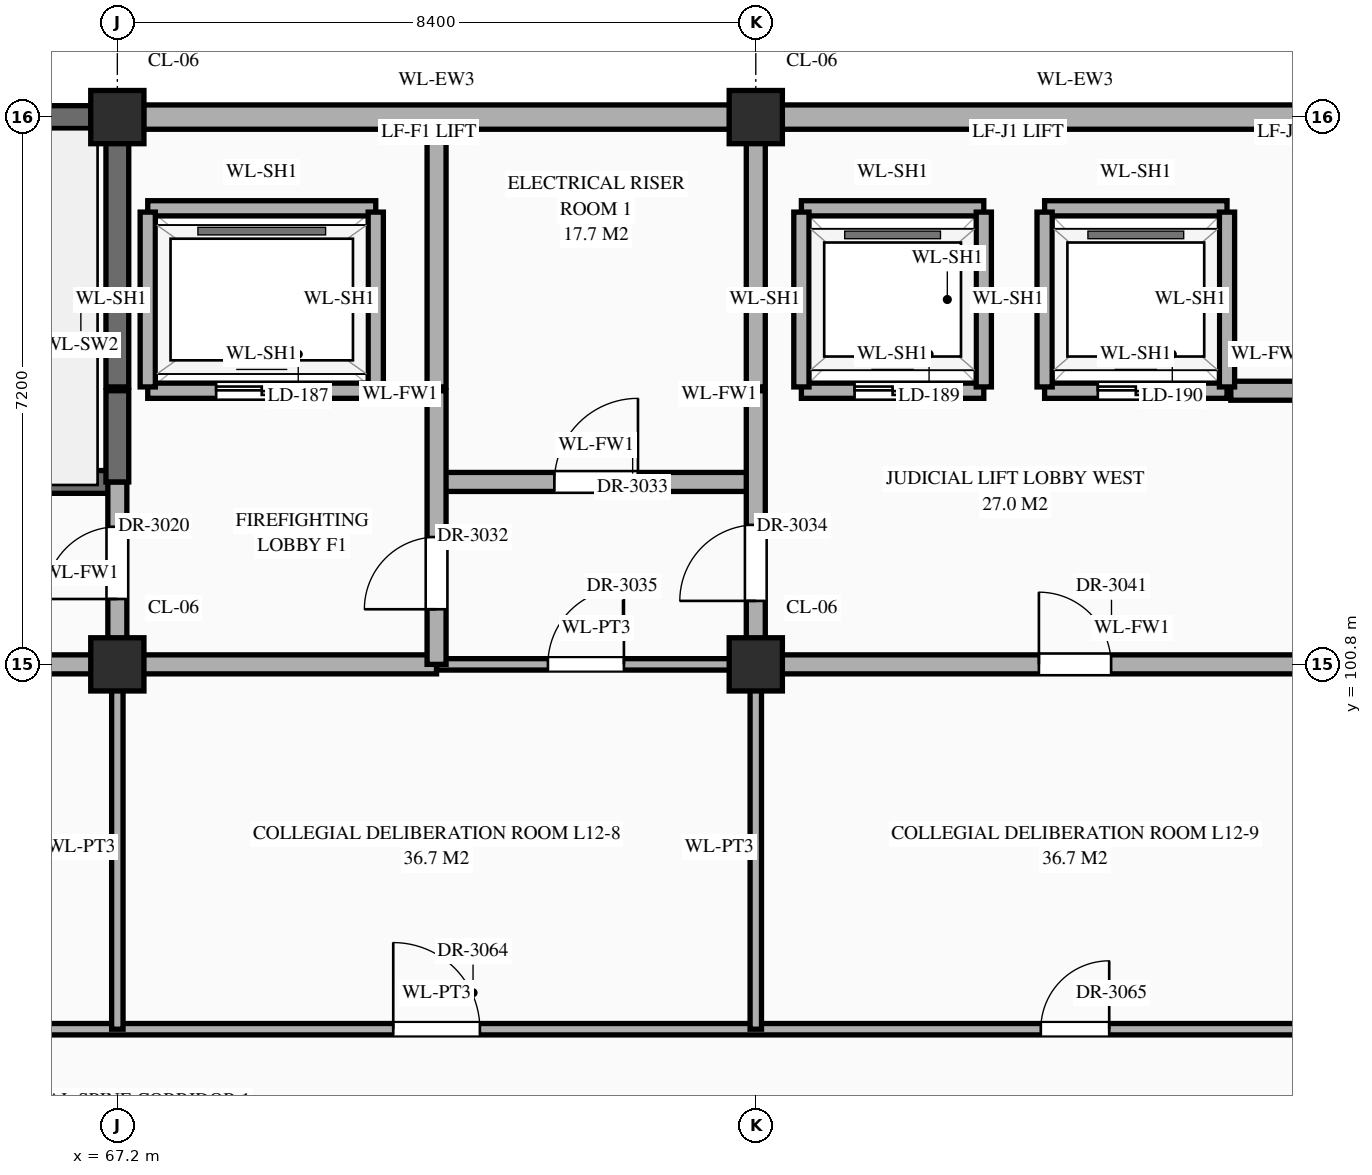
"""IFC4 building model, lengths in metres.
Left out: names, types, materials, properties, quantities, classifications, styles, units other than length and angle.
Written with IfcOpenShell. Run it as: python <this file> out.ifc"""

import sys

from ifc_helpers import new_model, si_unit, direction, frame, frame_2d, origin, origin_2d, place, context, subcontext, project, spatial, rectangle, extrude, element, fill, save


model = new_model("IFC4")
c1 = context("Model", 3, precision=1e-05, world=origin(), true_north=direction((0.0, 1.0)))
c2 = subcontext(c1, "Body", "Model", "MODEL_VIEW")
j1 = project(units=[si_unit("LENGTHUNIT", "METRE"), si_unit("PLANEANGLEUNIT", "RADIAN")], contexts=[c1])
p1 = place(None, origin())
s1 = spatial("IfcSite", under=j1, at=p1, CompositionType="ELEMENT")
p2 = place(p1, origin())
s2 = spatial("IfcBuilding", under=s1, at=p2, CompositionType="ELEMENT")
p3 = place(p2, frame((0.0, 0.0, 51.9)))
s3 = spatial("IfcBuildingStorey", under=s2, at=p3, CompositionType="ELEMENT", Elevation=51.9)
for number, where, z_axis, x_axis in (
    (1, (67.2, 100.8, 0.0), (0.0, 0.0, 1.0), (1.0, 0.0, 0.0)),
    (2, (67.2, 108.0, 0.0), (0.0, 0.0, 1.0), (1.0, 0.0, 0.0)),
    (3, (75.6, 100.8, 0.0), (0.0, 0.0, 1.0), (1.0, 0.0, 0.0)),
    (4, (75.6, 108.0, 0.0), (0.0, 0.0, 1.0), (1.0, 0.0, 0.0)),
):
    element("IfcColumn", number, at=place(p3, frame(where, z_axis=z_axis, x_axis=x_axis)), inside=s3, PredefinedType="COLUMN", context=c2, shape_type="SweptSolid", body=[
        extrude(rectangle(XDim=0.7, YDim=0.7, at=origin_2d()), origin(), (0.0, 0.0, 1.0), 4.2),
    ])
p4 = place(p3, frame((59.145, 108.0, 0.0), z_axis=(0.0, 0.0, 1.0), x_axis=(1.0, 0.0, 0.0)))
e5 = element("IfcWall", 5, at=p4, inside=s3, PredefinedType="SHEAR", context=c2, shape_type="SweptSolid", body=[
    extrude(rectangle(XDim=7.71, YDim=0.3, at=frame_2d((3.855, 0.0))), origin(), (0.0, 0.0, 1.0), 3.96),
])
for number, where, z_axis, x_axis in (
    (6, (67.545, 108.0, 0.0), (0.0, 0.0, 1.0), (1.0, 0.0, 0.0)),
    (7, (75.945, 108.0, 0.0), (0.0, 0.0, 1.0), (1.0, 0.0, 0.0)),
):
    element("IfcWall", number, at=place(p3, frame(where, z_axis=z_axis, x_axis=x_axis)), inside=s3, PredefinedType="STANDARD", context=c2, shape_type="SweptSolid", body=[
        extrude(rectangle(XDim=7.71, YDim=0.32, at=frame_2d((3.855, 0.0))), origin(), (0.0, 0.0, 1.0), 3.31),
    ])
p5 = place(p3, frame((58.8, 96.0, 0.0), z_axis=(0.0, 0.0, 1.0), x_axis=(1.0, 0.0, 0.0)))
e8 = element("IfcWall", 8, at=p5, inside=s3, PredefinedType="STANDARD", context=c2, shape_type="SweptSolid", body=[
    extrude(rectangle(XDim=25.2, YDim=0.15, at=frame_2d((12.6, 0.0))), origin(), (0.0, 0.0, 1.0), 3.96),
])
p6 = place(p5, frame((3.67, 0.0, 0.0)))
e9 = element("IfcOpeningElement", 9, at=p6, cuts=e8, PredefinedType="OPENING", context=c2, shape_type="SweptSolid", body=[
    extrude(rectangle(XDim=1.06, YDim=2.4, at=frame_2d((0.53, 1.2))), frame((0.0, 0.087, 0.0), z_axis=(0.0, -1.0, 0.0), x_axis=(1.0, 0.0, 0.0)), (0.0, 0.0, 1.0), 0.174),
])
p7 = place(p5, frame((12.03, 0.0, 0.0)))
e10 = element("IfcOpeningElement", 10, at=p7, cuts=e8, PredefinedType="OPENING", context=c2, shape_type="SweptSolid", body=[
    extrude(rectangle(XDim=1.14, YDim=2.4, at=frame_2d((0.57, 1.2))), frame((0.0, 0.087, 0.0), z_axis=(0.0, -1.0, 0.0), x_axis=(1.0, 0.0, 0.0)), (0.0, 0.0, 1.0), 0.174),
])
p8 = place(p5, frame((20.55, 0.0, 0.0)))
e11 = element("IfcOpeningElement", 11, at=p8, cuts=e8, PredefinedType="OPENING", context=c2, shape_type="SweptSolid", body=[
    extrude(rectangle(XDim=0.9, YDim=2.15, at=frame_2d((0.45, 1.075))), frame((0.0, 0.087, 0.0), z_axis=(0.0, -1.0, 0.0), x_axis=(1.0, 0.0, 0.0)), (0.0, 0.0, 1.0), 0.174),
])
p9 = place(p3, frame((58.8, 100.8, 0.0), z_axis=(0.0, 0.0, 1.0), x_axis=(1.0, 0.0, 0.0)))
e12 = element("IfcWall", 12, at=p9, inside=s3, PredefinedType="STANDARD", context=c2, shape_type="SweptSolid", body=[
    extrude(rectangle(XDim=12.6, YDim=0.25, at=frame_2d((6.3, 0.0))), origin(), (0.0, 0.0, 1.0), 3.11),
])
p10 = place(p9, frame((3.7, 0.0, 0.0)))
e13 = element("IfcOpeningElement", 13, at=p10, cuts=e12, PredefinedType="OPENING", context=c2, shape_type="SweptSolid", body=[
    extrude(rectangle(XDim=1.0, YDim=2.2, at=frame_2d((0.5, 1.1))), frame((0.0, 0.137, 0.0), z_axis=(0.0, -1.0, 0.0), x_axis=(1.0, 0.0, 0.0)), (0.0, 0.0, 1.0), 0.274),
])
p11 = place(p3, frame((71.4, 100.8, 0.0), z_axis=(0.0, 0.0, 1.0), x_axis=(1.0, 0.0, 0.0)))
e14 = element("IfcWall", 14, at=p11, inside=s3, PredefinedType="STANDARD", context=c2, shape_type="SweptSolid", body=[
    extrude(rectangle(XDim=4.2, YDim=0.15, at=frame_2d((2.1, 0.0))), origin(), (0.0, 0.0, 1.0), 3.11),
])
p12 = place(p11, frame((1.465, 0.0, 0.0)))
e15 = element("IfcOpeningElement", 15, at=p12, cuts=e14, PredefinedType="OPENING", context=c2, shape_type="SweptSolid", body=[
    extrude(rectangle(XDim=1.0, YDim=2.25, at=frame_2d((0.5, 1.125))), frame((0.0, 0.087, 0.0), z_axis=(0.0, -1.0, 0.0), x_axis=(1.0, 0.0, 0.0)), (0.0, 0.0, 1.0), 0.174),
])
p13 = place(p3, frame((75.6, 100.8, 0.0), z_axis=(0.0, 0.0, 1.0), x_axis=(1.0, 0.0, 0.0)))
e16 = element("IfcWall", 16, at=p13, inside=s3, PredefinedType="STANDARD", context=c2, shape_type="SweptSolid", body=[
    extrude(rectangle(XDim=16.8, YDim=0.25, at=frame_2d((8.4, 0.0))), origin(), (0.0, 0.0, 1.0), 3.11),
])
p14 = place(p13, frame((3.725, 0.0, 0.0)))
e17 = element("IfcOpeningElement", 17, at=p14, cuts=e16, PredefinedType="OPENING", context=c2, shape_type="SweptSolid", body=[
    extrude(rectangle(XDim=0.95, YDim=2.15, at=frame_2d((0.475, 1.075))), frame((0.0, 0.137, 0.0), z_axis=(0.0, -1.0, 0.0), x_axis=(1.0, 0.0, 0.0)), (0.0, 0.0, 1.0), 0.274),
])
p15 = place(p13, frame((9.685, 0.0, 0.0)))
e18 = element("IfcOpeningElement", 18, at=p15, cuts=e16, PredefinedType="OPENING", context=c2, shape_type="SweptSolid", body=[
    extrude(rectangle(XDim=1.1, YDim=2.2, at=frame_2d((0.55, 1.1))), frame((0.0, 0.137, 0.0), z_axis=(0.0, -1.0, 0.0), x_axis=(1.0, 0.0, 0.0)), (0.0, 0.0, 1.0), 0.274),
])
p16 = place(p13, frame((12.5, 0.0, 0.0)))
e19 = element("IfcOpeningElement", 19, at=p16, cuts=e16, PredefinedType="OPENING", context=c2, shape_type="SweptSolid", body=[
    extrude(rectangle(XDim=1.0, YDim=2.2, at=frame_2d((0.5, 1.1))), frame((0.0, 0.137, 0.0), z_axis=(0.0, -1.0, 0.0), x_axis=(1.0, 0.0, 0.0)), (0.0, 0.0, 1.0), 0.274),
])
p17 = place(p13, frame((14.89, 0.0, 0.0)))
e20 = element("IfcOpeningElement", 20, at=p17, cuts=e16, PredefinedType="OPENING", context=c2, shape_type="SweptSolid", body=[
    extrude(rectangle(XDim=0.95, YDim=2.15, at=frame_2d((0.475, 1.075))), frame((0.0, 0.137, 0.0), z_axis=(0.0, -1.0, 0.0), x_axis=(1.0, 0.0, 0.0)), (0.0, 0.0, 1.0), 0.274),
])
p18 = place(p3, frame((58.8, 103.2, 0.0), z_axis=(0.0, 0.0, 1.0), x_axis=(1.0, 0.0, 0.0)))
e21 = element("IfcWall", 21, at=p18, inside=s3, PredefinedType="SHEAR", context=c2, shape_type="SweptSolid", body=[
    extrude(rectangle(XDim=8.4, YDim=0.3, at=frame_2d((4.2, 0.0))), origin(), (0.0, 0.0, 1.0), 3.96),
])
p19 = place(p18, frame((0.65, 0.0, 0.0)))
e22 = element("IfcOpeningElement", 22, at=p19, cuts=e21, PredefinedType="OPENING", context=c2, shape_type="SweptSolid", body=[
    extrude(rectangle(XDim=1.1, YDim=2.2, at=frame_2d((0.55, 1.1))), frame((0.0, 0.162, 0.0), z_axis=(0.0, -1.0, 0.0), x_axis=(1.0, 0.0, 0.0)), (0.0, 0.0, 1.0), 0.324),
])
p20 = place(p3, frame((71.4, 103.2, 0.0), z_axis=(0.0, 0.0, 1.0), x_axis=(1.0, 0.0, 0.0)))
e23 = element("IfcWall", 23, at=p20, inside=s3, PredefinedType="STANDARD", context=c2, shape_type="SweptSolid", body=[
    extrude(rectangle(XDim=4.2, YDim=0.25, at=frame_2d((2.1, 0.0))), origin(), (0.0, 0.0, 1.0), 3.96),
])
p21 = place(p20, frame((1.55, 0.0, 0.0)))
e24 = element("IfcOpeningElement", 24, at=p21, cuts=e23, PredefinedType="OPENING", context=c2, shape_type="SweptSolid", body=[
    extrude(rectangle(XDim=1.1, YDim=2.2, at=frame_2d((0.55, 1.1))), frame((0.0, 0.137, 0.0), z_axis=(0.0, -1.0, 0.0), x_axis=(1.0, 0.0, 0.0)), (0.0, 0.0, 1.0), 0.274),
])
p22 = place(p3, frame((67.6, 104.4, 0.0), z_axis=(0.0, 0.0, 1.0), x_axis=(1.0, 0.0, 0.0)))
e25 = element("IfcWall", 25, at=p22, inside=s3, PredefinedType="STANDARD", context=c2, shape_type="SweptSolid", body=[
    extrude(rectangle(XDim=3.0, YDim=0.2, at=frame_2d((1.5, 0.0))), origin(), (0.0, 0.0, 1.0), 3.96),
])
p23 = place(p22, frame((0.9, 0.0, 0.0)))
e26 = element("IfcOpeningElement", 26, at=p23, cuts=e25, PredefinedType="OPENING", context=c2, shape_type="SweptSolid", body=[
    extrude(rectangle(XDim=1.2, YDim=2.15, at=frame_2d((0.6, 1.075))), frame((0.0, 0.112, 0.0), z_axis=(0.0, -1.0, 0.0), x_axis=(1.0, 0.0, 0.0)), (0.0, 0.0, 1.0), 0.224),
])
p24 = place(p3, frame((76.2, 104.4, 0.0), z_axis=(0.0, 0.0, 1.0), x_axis=(1.0, 0.0, 0.0)))
e27 = element("IfcWall", 27, at=p24, inside=s3, PredefinedType="STANDARD", context=c2, shape_type="SweptSolid", body=[
    extrude(rectangle(XDim=2.4, YDim=0.2, at=frame_2d((1.2, 0.0))), origin(), (0.0, 0.0, 1.0), 3.96),
])
p25 = place(p24, frame((0.7, 0.0, 0.0)))
e28 = element("IfcOpeningElement", 28, at=p25, cuts=e27, PredefinedType="OPENING", context=c2, shape_type="SweptSolid", body=[
    extrude(rectangle(XDim=1.0, YDim=2.15, at=frame_2d((0.5, 1.075))), frame((0.0, 0.112, 0.0), z_axis=(0.0, -1.0, 0.0), x_axis=(1.0, 0.0, 0.0)), (0.0, 0.0, 1.0), 0.224),
])
p26 = place(p3, frame((79.4, 104.4, 0.0), z_axis=(0.0, 0.0, 1.0), x_axis=(1.0, 0.0, 0.0)))
e29 = element("IfcWall", 29, at=p26, inside=s3, PredefinedType="STANDARD", context=c2, shape_type="SweptSolid", body=[
    extrude(rectangle(XDim=2.4, YDim=0.2, at=frame_2d((1.2, 0.0))), origin(), (0.0, 0.0, 1.0), 3.96),
])
p27 = place(p26, frame((0.7, 0.0, 0.0)))
e30 = element("IfcOpeningElement", 30, at=p27, cuts=e29, PredefinedType="OPENING", context=c2, shape_type="SweptSolid", body=[
    extrude(rectangle(XDim=1.0, YDim=2.15, at=frame_2d((0.5, 1.075))), frame((0.0, 0.112, 0.0), z_axis=(0.0, -1.0, 0.0), x_axis=(1.0, 0.0, 0.0)), (0.0, 0.0, 1.0), 0.224),
])
p28 = place(p3, frame((81.85, 104.4, 0.0), z_axis=(0.0, 0.0, 1.0), x_axis=(1.0, 0.0, 0.0)))
e31 = element("IfcWall", 31, at=p28, inside=s3, PredefinedType="STANDARD", context=c2, shape_type="SweptSolid", body=[
    extrude(rectangle(XDim=2.1, YDim=0.25, at=frame_2d((1.05, 0.0))), origin(), (0.0, 0.0, 1.0), 3.96),
])
p29 = place(p3, frame((67.6, 106.8, 0.0), z_axis=(0.0, 0.0, 1.0), x_axis=(1.0, 0.0, 0.0)))
e32 = element("IfcWall", 32, at=p29, inside=s3, PredefinedType="STANDARD", context=c2, shape_type="SweptSolid", body=[
    extrude(rectangle(XDim=3.0, YDim=0.2, at=frame_2d((1.5, 0.0))), origin(), (0.0, 0.0, 1.0), 3.96),
])
for number, where, z_axis, x_axis in (
    (33, (76.2, 106.8, 0.0), (0.0, 0.0, 1.0), (1.0, 0.0, 0.0)),
    (34, (79.4, 106.8, 0.0), (0.0, 0.0, 1.0), (1.0, 0.0, 0.0)),
):
    element("IfcWall", number, at=place(p3, frame(where, z_axis=z_axis, x_axis=x_axis)), inside=s3, PredefinedType="STANDARD", context=c2, shape_type="SweptSolid", body=[
        extrude(rectangle(XDim=2.4, YDim=0.2, at=frame_2d((1.2, 0.0))), origin(), (0.0, 0.0, 1.0), 3.96),
    ])
p30 = place(p3, frame((67.2, 96.0, 0.0), z_axis=(0.0, 0.0, 1.0), x_axis=(0.0, 1.0, 0.0)))
e35 = element("IfcWall", 35, at=p30, inside=s3, PredefinedType="STANDARD", context=c2, shape_type="SweptSolid", body=[
    extrude(rectangle(XDim=4.8, YDim=0.15, at=frame_2d((2.4, 0.0))), origin(), (0.0, 0.0, 1.0), 3.21),
])
p31 = place(p3, frame((67.2, 100.8, 0.0), z_axis=(0.0, 0.0, 1.0), x_axis=(0.0, 1.0, 0.0)))
e36 = element("IfcWall", 36, at=p31, inside=s3, PredefinedType="STANDARD", context=c2, shape_type="SweptSolid", body=[
    extrude(rectangle(XDim=2.4, YDim=0.25, at=frame_2d((1.2, 0.0))), origin(), (0.0, 0.0, 1.0), 3.21),
])
p32 = place(p31, frame((0.86, 0.0, 0.0)))
e37 = element("IfcOpeningElement", 37, at=p32, cuts=e36, PredefinedType="OPENING", context=c2, shape_type="SweptSolid", body=[
    extrude(rectangle(XDim=0.95, YDim=2.15, at=frame_2d((0.475, 1.075))), frame((0.0, 0.137, 0.0), z_axis=(0.0, -1.0, 0.0), x_axis=(1.0, 0.0, 0.0)), (0.0, 0.0, 1.0), 0.274),
])
p33 = place(p3, frame((67.2, 103.2, 0.0), z_axis=(0.0, 0.0, 1.0), x_axis=(0.0, 1.0, 0.0)))
e38 = element("IfcWall", 38, at=p33, inside=s3, PredefinedType="SHEAR", context=c2, shape_type="SweptSolid", body=[
    extrude(rectangle(XDim=1.2, YDim=0.3, at=frame_2d((0.6, 0.0))), origin(), (0.0, 0.0, 1.0), 3.96),
])
p34 = place(p3, frame((67.2, 104.45, 0.0), z_axis=(0.0, 0.0, 1.0), x_axis=(0.0, 1.0, 0.0)))
e39 = element("IfcWall", 39, at=p34, inside=s3, PredefinedType="SHEAR", context=c2, shape_type="SweptSolid", body=[
    extrude(rectangle(XDim=3.46, YDim=0.3, at=frame_2d((1.73, 0.0))), origin(), (0.0, 0.0, 1.0), 3.96),
])
for number, where, z_axis, x_axis in (
    (40, (67.6, 104.45, 0.0), (0.0, 0.0, 1.0), (0.0, 1.0, 0.0)),
    (41, (70.6, 104.45, 0.0), (0.0, 0.0, 1.0), (0.0, 1.0, 0.0)),
):
    element("IfcWall", number, at=place(p3, frame(where, z_axis=z_axis, x_axis=x_axis)), inside=s3, PredefinedType="STANDARD", context=c2, shape_type="SweptSolid", body=[
        extrude(rectangle(XDim=2.3, YDim=0.2, at=frame_2d((1.15, 0.0))), origin(), (0.0, 0.0, 1.0), 3.96),
    ])
p35 = place(p3, frame((71.4, 100.8, 0.0), z_axis=(0.0, 0.0, 1.0), x_axis=(0.0, 1.0, 0.0)))
e42 = element("IfcWall", 42, at=p35, inside=s3, PredefinedType="STANDARD", context=c2, shape_type="SweptSolid", body=[
    extrude(rectangle(XDim=3.6, YDim=0.25, at=frame_2d((1.8, 0.0))), origin(), (0.0, 0.0, 1.0), 3.61),
])
p36 = place(p35, frame((0.725, 0.0, 0.0)))
e43 = element("IfcOpeningElement", 43, at=p36, cuts=e42, PredefinedType="OPENING", context=c2, shape_type="SweptSolid", body=[
    extrude(rectangle(XDim=0.95, YDim=2.15, at=frame_2d((0.475, 1.075))), frame((0.0, 0.137, 0.0), z_axis=(0.0, -1.0, 0.0), x_axis=(1.0, 0.0, 0.0)), (0.0, 0.0, 1.0), 0.274),
])
p37 = place(p3, frame((71.4, 104.45, 0.0), z_axis=(0.0, 0.0, 1.0), x_axis=(0.0, 1.0, 0.0)))
e44 = element("IfcWall", 44, at=p37, inside=s3, PredefinedType="STANDARD", context=c2, shape_type="SweptSolid", body=[
    extrude(rectangle(XDim=3.46, YDim=0.25, at=frame_2d((1.73, 0.0))), origin(), (0.0, 0.0, 1.0), 3.61),
])
p38 = place(p3, frame((75.6, 96.0, 0.0), z_axis=(0.0, 0.0, 1.0), x_axis=(0.0, 1.0, 0.0)))
e45 = element("IfcWall", 45, at=p38, inside=s3, PredefinedType="STANDARD", context=c2, shape_type="SweptSolid", body=[
    extrude(rectangle(XDim=4.8, YDim=0.15, at=frame_2d((2.4, 0.0))), origin(), (0.0, 0.0, 1.0), 3.21),
])
p39 = place(p3, frame((75.6, 100.8, 0.0), z_axis=(0.0, 0.0, 1.0), x_axis=(0.0, 1.0, 0.0)))
e46 = element("IfcWall", 46, at=p39, inside=s3, PredefinedType="STANDARD", context=c2, shape_type="SweptSolid", body=[
    extrude(rectangle(XDim=3.6, YDim=0.25, at=frame_2d((1.8, 0.0))), origin(), (0.0, 0.0, 1.0), 3.21),
])
p40 = place(p39, frame((0.835, 0.0, 0.0)))
e47 = element("IfcOpeningElement", 47, at=p40, cuts=e46, PredefinedType="OPENING", context=c2, shape_type="SweptSolid", body=[
    extrude(rectangle(XDim=1.0, YDim=2.2, at=frame_2d((0.5, 1.1))), frame((0.0, 0.137, 0.0), z_axis=(0.0, -1.0, 0.0), x_axis=(1.0, 0.0, 0.0)), (0.0, 0.0, 1.0), 0.274),
])
p41 = place(p3, frame((75.6, 104.45, 0.0), z_axis=(0.0, 0.0, 1.0), x_axis=(0.0, 1.0, 0.0)))
e48 = element("IfcWall", 48, at=p41, inside=s3, PredefinedType="STANDARD", context=c2, shape_type="SweptSolid", body=[
    extrude(rectangle(XDim=3.46, YDim=0.25, at=frame_2d((1.73, 0.0))), origin(), (0.0, 0.0, 1.0), 3.21),
])
for number, where, z_axis, x_axis in (
    (49, (76.2, 104.45, 0.0), (0.0, 0.0, 1.0), (0.0, 1.0, 0.0)),
    (50, (78.6, 104.45, 0.0), (0.0, 0.0, 1.0), (0.0, 1.0, 0.0)),
    (51, (79.4, 104.45, 0.0), (0.0, 0.0, 1.0), (0.0, 1.0, 0.0)),
    (52, (81.8, 104.45, 0.0), (0.0, 0.0, 1.0), (0.0, 1.0, 0.0)),
):
    element("IfcWall", number, at=place(p3, frame(where, z_axis=z_axis, x_axis=x_axis)), inside=s3, PredefinedType="STANDARD", context=c2, shape_type="SweptSolid", body=[
        extrude(rectangle(XDim=2.3, YDim=0.2, at=frame_2d((1.15, 0.0))), origin(), (0.0, 0.0, 1.0), 3.96),
    ])
p42 = place(p23, origin())
e53 = element("IfcDoor", 53, at=p42, inside=s3, OperationType="DOUBLE_DOOR_SLIDING", PredefinedType="DOOR", context=c2, shape_type="SweptSolid", body=[
    extrude(rectangle(XDim=1.2, YDim=2.15, at=frame_2d((0.6, 1.075))), frame((0.0, 0.025, 0.0), z_axis=(0.0, -1.0, 0.0), x_axis=(1.0, 0.0, 0.0)), (0.0, 0.0, 1.0), 0.05),
])
fill(e26, e53)
p43 = place(p25, origin())
e54 = element("IfcDoor", 54, at=p43, inside=s3, OperationType="DOUBLE_DOOR_SLIDING", PredefinedType="DOOR", context=c2, shape_type="SweptSolid", body=[
    extrude(rectangle(XDim=1.0, YDim=2.15, at=frame_2d((0.5, 1.075))), frame((0.0, 0.025, 0.0), z_axis=(0.0, -1.0, 0.0), x_axis=(1.0, 0.0, 0.0)), (0.0, 0.0, 1.0), 0.05),
])
fill(e28, e54)
p44 = place(p27, origin())
e55 = element("IfcDoor", 55, at=p44, inside=s3, OperationType="DOUBLE_DOOR_SLIDING", PredefinedType="DOOR", context=c2, shape_type="SweptSolid", body=[
    extrude(rectangle(XDim=1.0, YDim=2.15, at=frame_2d((0.5, 1.075))), frame((0.0, 0.025, 0.0), z_axis=(0.0, -1.0, 0.0), x_axis=(1.0, 0.0, 0.0)), (0.0, 0.0, 1.0), 0.05),
])
fill(e30, e55)
p45 = place(p32, origin())
e56 = element("IfcDoor", 56, at=p45, inside=s3, OperationType="SINGLE_SWING_LEFT", PredefinedType="DOOR", context=c2, shape_type="SweptSolid", body=[
    extrude(rectangle(XDim=0.95, YDim=2.15, at=frame_2d((0.475, 1.075))), frame((0.0, 0.025, 0.0), z_axis=(0.0, -1.0, 0.0), x_axis=(1.0, 0.0, 0.0)), (0.0, 0.0, 1.0), 0.05),
])
fill(e37, e56)
p46 = place(p36, origin())
e57 = element("IfcDoor", 57, at=p46, inside=s3, OperationType="SINGLE_SWING_LEFT", PredefinedType="DOOR", context=c2, shape_type="SweptSolid", body=[
    extrude(rectangle(XDim=0.95, YDim=2.15, at=frame_2d((0.475, 1.075))), frame((0.0, 0.025, 0.0), z_axis=(0.0, -1.0, 0.0), x_axis=(1.0, 0.0, 0.0)), (0.0, 0.0, 1.0), 0.05),
])
fill(e43, e57)
p47 = place(p21, origin())
e58 = element("IfcDoor", 58, at=p47, inside=s3, OperationType="SINGLE_SWING_RIGHT", PredefinedType="DOOR", context=c2, shape_type="SweptSolid", body=[
    extrude(rectangle(XDim=1.1, YDim=2.2, at=frame_2d((0.55, 1.1))), frame((0.0, 0.025, 0.0), z_axis=(0.0, -1.0, 0.0), x_axis=(1.0, 0.0, 0.0)), (0.0, 0.0, 1.0), 0.05),
])
fill(e24, e58)
p48 = place(p40, origin())
e59 = element("IfcDoor", 59, at=p48, inside=s3, OperationType="SINGLE_SWING_LEFT", PredefinedType="DOOR", context=c2, shape_type="SweptSolid", body=[
    extrude(rectangle(XDim=1.0, YDim=2.2, at=frame_2d((0.5, 1.1))), frame((0.0, 0.025, 0.0), z_axis=(0.0, -1.0, 0.0), x_axis=(1.0, 0.0, 0.0)), (0.0, 0.0, 1.0), 0.05),
])
fill(e47, e59)
p49 = place(p12, origin())
e60 = element("IfcDoor", 60, at=p49, inside=s3, OperationType="SINGLE_SWING_RIGHT", PredefinedType="DOOR", context=c2, shape_type="SweptSolid", body=[
    extrude(rectangle(XDim=1.0, YDim=2.25, at=frame_2d((0.5, 1.125))), frame((0.0, 0.025, 0.0), z_axis=(0.0, -1.0, 0.0), x_axis=(1.0, 0.0, 0.0)), (0.0, 0.0, 1.0), 0.05),
])
fill(e15, e60)
p50 = place(p14, origin())
e61 = element("IfcDoor", 61, at=p50, inside=s3, OperationType="SINGLE_SWING_LEFT", PredefinedType="DOOR", context=c2, shape_type="SweptSolid", body=[
    extrude(rectangle(XDim=0.95, YDim=2.15, at=frame_2d((0.475, 1.075))), frame((0.0, 0.025, 0.0), z_axis=(0.0, -1.0, 0.0), x_axis=(1.0, 0.0, 0.0)), (0.0, 0.0, 1.0), 0.05),
])
fill(e17, e61)
p51 = place(p7, origin())
e62 = element("IfcDoor", 62, at=p51, inside=s3, OperationType="SINGLE_SWING_LEFT", PredefinedType="DOOR", context=c2, shape_type="SweptSolid", body=[
    extrude(rectangle(XDim=1.14, YDim=2.4, at=frame_2d((0.57, 1.2))), frame((0.0, 0.025, 0.0), z_axis=(0.0, -1.0, 0.0), x_axis=(1.0, 0.0, 0.0)), (0.0, 0.0, 1.0), 0.05),
])
fill(e10, e62)
p52 = place(p8, origin())
e63 = element("IfcDoor", 63, at=p52, inside=s3, OperationType="SINGLE_SWING_RIGHT", PredefinedType="DOOR", context=c2, shape_type="SweptSolid", body=[
    extrude(rectangle(XDim=0.9, YDim=2.15, at=frame_2d((0.45, 1.075))), frame((0.0, 0.025, 0.0), z_axis=(0.0, -1.0, 0.0), x_axis=(1.0, 0.0, 0.0)), (0.0, 0.0, 1.0), 0.05),
])
fill(e11, e63)
save(model, sys.argv[1])
